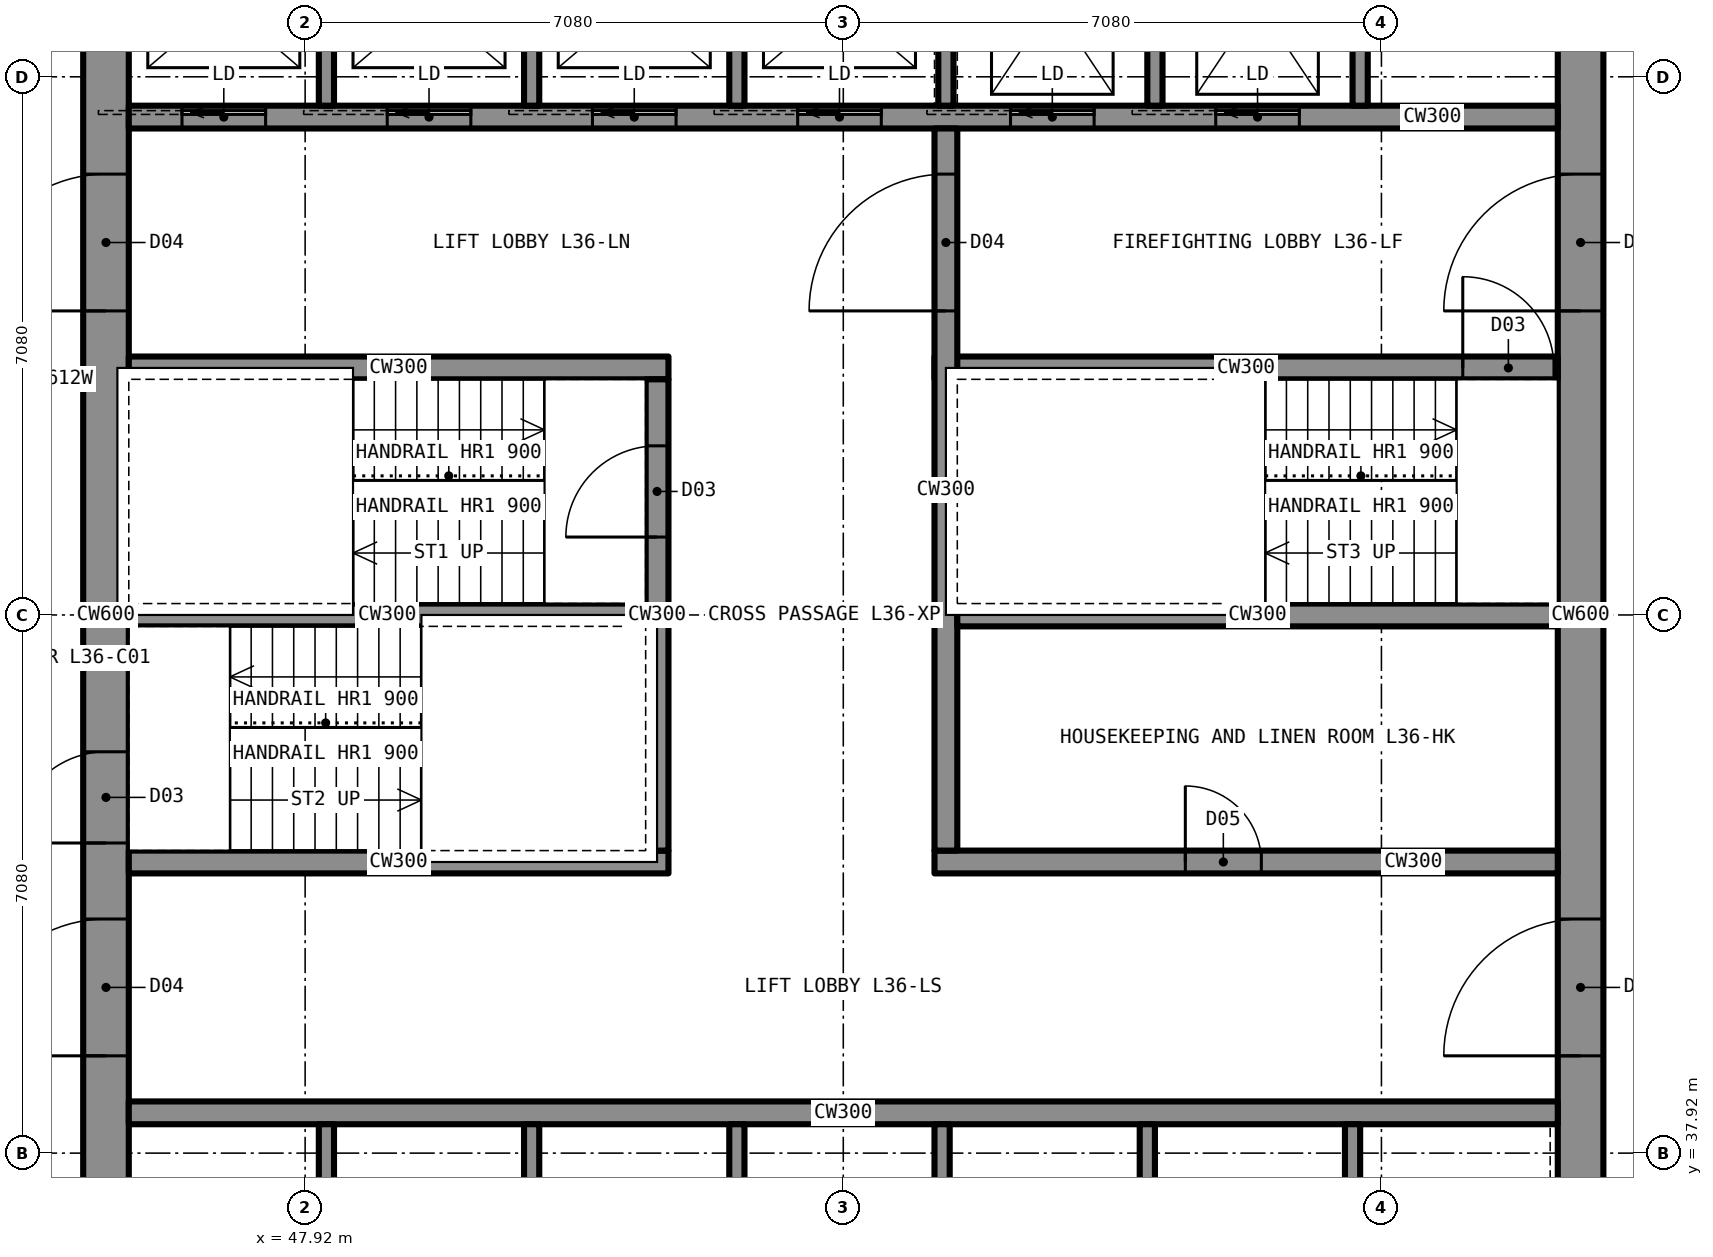
"""IFC4 building model, lengths in metres.
Left out: names, types, materials, properties, quantities, classifications, styles, units other than length and angle.
Written with IfcOpenShell. Run it as: python <this file> out.ifc"""

import sys

from ifc_helpers import new_model, si_unit, direction, frame, frame_2d, origin, place, context, subcontext, project, spatial, rectangle, extrude, element, fill, save


model = new_model("IFC4")
c1 = context("Model", 3, precision=1e-05, world=origin(), true_north=direction((0.0, 1.0)))
c2 = subcontext(c1, "Body", "Model", "MODEL_VIEW")
j1 = project(units=[si_unit("LENGTHUNIT", "METRE"), si_unit("PLANEANGLEUNIT", "RADIAN")], contexts=[c1])
p1 = place(None, origin())
s1 = spatial("IfcSite", under=j1, at=p1, CompositionType="ELEMENT")
p2 = place(p1, origin())
s2 = spatial("IfcBuilding", under=s1, at=p2, CompositionType="ELEMENT")
p3 = place(p2, frame((0.0, 0.0, 135.4)))
s3 = spatial("IfcBuildingStorey", under=s2, at=p3, CompositionType="ELEMENT", Elevation=135.4)
p4 = place(p3, frame((64.7, 35.6, 0.0), z_axis=(0.0, 0.0, 1.0), x_axis=(0.0, 1.0, 0.0)))
e1 = element("IfcWall", 1, at=p4, inside=s3, PredefinedType="SHEAR", context=c2, shape_type="SweptSolid", body=[
    extrude(rectangle(XDim=18.8, YDim=0.6, at=frame_2d((9.4, 0.0))), origin(), (0.0, 0.0, 1.0), 3.5),
])
p5 = place(p4, frame((13.4, 0.0, 0.0)))
e2 = element("IfcOpeningElement", 2, at=p5, cuts=e1, PredefinedType="OPENING", context=c2, shape_type="SweptSolid", body=[
    extrude(rectangle(XDim=1.8, YDim=2.2, at=frame_2d((0.9, 1.1))), frame((0.0, 0.31, 0.0), z_axis=(0.0, -1.0, 0.0), x_axis=(1.0, 0.0, 0.0)), (0.0, 0.0, 1.0), 0.62),
])
p6 = place(p4, frame((3.6, 0.0, 0.0)))
e3 = element("IfcOpeningElement", 3, at=p6, cuts=e1, PredefinedType="OPENING", context=c2, shape_type="SweptSolid", body=[
    extrude(rectangle(XDim=1.8, YDim=2.2, at=frame_2d((0.9, 1.1))), frame((0.0, 0.31, 0.0), z_axis=(0.0, -1.0, 0.0), x_axis=(1.0, 0.0, 0.0)), (0.0, 0.0, 1.0), 0.62),
])
p7 = place(p3, frame((45.3, 35.6, 0.0), z_axis=(0.0, 0.0, 1.0), x_axis=(0.0, 1.0, 0.0)))
e4 = element("IfcWall", 4, at=p7, inside=s3, PredefinedType="SHEAR", context=c2, shape_type="SweptSolid", body=[
    extrude(rectangle(XDim=18.8, YDim=0.6, at=frame_2d((9.4, 0.0))), origin(), (0.0, 0.0, 1.0), 3.5),
])
p8 = place(p7, frame((13.4, 0.0, 0.0)))
e5 = element("IfcOpeningElement", 5, at=p8, cuts=e4, PredefinedType="OPENING", context=c2, shape_type="SweptSolid", body=[
    extrude(rectangle(XDim=1.8, YDim=2.2, at=frame_2d((0.9, 1.1))), frame((0.0, 0.31, 0.0), z_axis=(0.0, -1.0, 0.0), x_axis=(1.0, 0.0, 0.0)), (0.0, 0.0, 1.0), 0.62),
])
p9 = place(p7, frame((3.6, 0.0, 0.0)))
e6 = element("IfcOpeningElement", 6, at=p9, cuts=e4, PredefinedType="OPENING", context=c2, shape_type="SweptSolid", body=[
    extrude(rectangle(XDim=1.8, YDim=2.2, at=frame_2d((0.9, 1.1))), frame((0.0, 0.31, 0.0), z_axis=(0.0, -1.0, 0.0), x_axis=(1.0, 0.0, 0.0)), (0.0, 0.0, 1.0), 0.62),
])
p10 = place(p7, frame((6.4, 0.0, 0.0)))
e7 = element("IfcOpeningElement", 7, at=p10, cuts=e4, PredefinedType="OPENING", context=c2, shape_type="SweptSolid", body=[
    extrude(rectangle(XDim=1.2, YDim=2.2, at=frame_2d((0.6, 1.1))), frame((0.0, 0.31, 0.0), z_axis=(0.0, -1.0, 0.0), x_axis=(1.0, 0.0, 0.0)), (0.0, 0.0, 1.0), 0.62),
])
p11 = place(p3, frame((45.6, 51.55, 0.0), z_axis=(0.0, 0.0, 1.0), x_axis=(1.0, 0.0, 0.0)))
e8 = element("IfcWall", 8, at=p11, inside=s3, PredefinedType="SHEAR", context=c2, shape_type="SweptSolid", body=[
    extrude(rectangle(XDim=18.8, YDim=0.3, at=frame_2d((9.4, 0.0))), origin(), (0.0, 0.0, 1.0), 3.5),
])
p12 = place(p11, frame((0.7, 0.0, 0.0)))
e9 = element("IfcOpeningElement", 9, at=p12, cuts=e8, PredefinedType="OPENING", context=c2, shape_type="SweptSolid", body=[
    extrude(rectangle(XDim=1.1, YDim=2.2, at=frame_2d((0.55, 1.1))), frame((0.0, 0.16, 0.0), z_axis=(0.0, -1.0, 0.0), x_axis=(1.0, 0.0, 0.0)), (0.0, 0.0, 1.0), 0.32),
])
p13 = place(p11, frame((3.4, 0.0, 0.0)))
e10 = element("IfcOpeningElement", 10, at=p13, cuts=e8, PredefinedType="OPENING", context=c2, shape_type="SweptSolid", body=[
    extrude(rectangle(XDim=1.1, YDim=2.2, at=frame_2d((0.55, 1.1))), frame((0.0, 0.16, 0.0), z_axis=(0.0, -1.0, 0.0), x_axis=(1.0, 0.0, 0.0)), (0.0, 0.0, 1.0), 0.32),
])
p14 = place(p11, frame((6.1, 0.0, 0.0)))
e11 = element("IfcOpeningElement", 11, at=p14, cuts=e8, PredefinedType="OPENING", context=c2, shape_type="SweptSolid", body=[
    extrude(rectangle(XDim=1.1, YDim=2.2, at=frame_2d((0.55, 1.1))), frame((0.0, 0.16, 0.0), z_axis=(0.0, -1.0, 0.0), x_axis=(1.0, 0.0, 0.0)), (0.0, 0.0, 1.0), 0.32),
])
p15 = place(p11, frame((8.8, 0.0, 0.0)))
e12 = element("IfcOpeningElement", 12, at=p15, cuts=e8, PredefinedType="OPENING", context=c2, shape_type="SweptSolid", body=[
    extrude(rectangle(XDim=1.1, YDim=2.2, at=frame_2d((0.55, 1.1))), frame((0.0, 0.16, 0.0), z_axis=(0.0, -1.0, 0.0), x_axis=(1.0, 0.0, 0.0)), (0.0, 0.0, 1.0), 0.32),
])
p16 = place(p11, frame((11.6, 0.0, 0.0)))
e13 = element("IfcOpeningElement", 13, at=p16, cuts=e8, PredefinedType="OPENING", context=c2, shape_type="SweptSolid", body=[
    extrude(rectangle(XDim=1.1, YDim=2.2, at=frame_2d((0.55, 1.1))), frame((0.0, 0.16, 0.0), z_axis=(0.0, -1.0, 0.0), x_axis=(1.0, 0.0, 0.0)), (0.0, 0.0, 1.0), 0.32),
])
p17 = place(p11, frame((14.3, 0.0, 0.0)))
e14 = element("IfcOpeningElement", 14, at=p17, cuts=e8, PredefinedType="OPENING", context=c2, shape_type="SweptSolid", body=[
    extrude(rectangle(XDim=1.1, YDim=2.2, at=frame_2d((0.55, 1.1))), frame((0.0, 0.16, 0.0), z_axis=(0.0, -1.0, 0.0), x_axis=(1.0, 0.0, 0.0)), (0.0, 0.0, 1.0), 0.32),
])
p18 = place(p3, frame((45.6, 38.45, 0.0), z_axis=(0.0, 0.0, 1.0), x_axis=(1.0, 0.0, 0.0)))
e15 = element("IfcWall", 15, at=p18, inside=s3, PredefinedType="SHEAR", context=c2, shape_type="SweptSolid", body=[
    extrude(rectangle(XDim=18.8, YDim=0.3, at=frame_2d((9.4, 0.0))), origin(), (0.0, 0.0, 1.0), 3.5),
])
p19 = place(p3, frame((45.6, 48.25, 0.0), z_axis=(0.0, 0.0, 1.0), x_axis=(1.0, 0.0, 0.0)))
e16 = element("IfcWall", 16, at=p19, inside=s3, PredefinedType="SHEAR", context=c2, shape_type="SweptSolid", body=[
    extrude(rectangle(XDim=7.1, YDim=0.3, at=frame_2d((3.55, 0.0))), origin(), (0.0, 0.0, 1.0), 3.5),
])
p20 = place(p3, frame((56.2, 48.25, 0.0), z_axis=(0.0, 0.0, 1.0), x_axis=(1.0, 0.0, 0.0)))
e17 = element("IfcWall", 17, at=p20, inside=s3, PredefinedType="SHEAR", context=c2, shape_type="SweptSolid", body=[
    extrude(rectangle(XDim=8.2, YDim=0.3, at=frame_2d((4.1, 0.0))), origin(), (0.0, 0.0, 1.0), 3.5),
])
p21 = place(p20, frame((6.95, 0.0, 0.0)))
e18 = element("IfcOpeningElement", 18, at=p21, cuts=e17, PredefinedType="OPENING", context=c2, shape_type="SweptSolid", body=[
    extrude(rectangle(XDim=1.2, YDim=2.2, at=frame_2d((0.6, 1.1))), frame((0.0, 0.16, 0.0), z_axis=(0.0, -1.0, 0.0), x_axis=(1.0, 0.0, 0.0)), (0.0, 0.0, 1.0), 0.32),
])
p22 = place(p3, frame((45.6, 41.75, 0.0), z_axis=(0.0, 0.0, 1.0), x_axis=(1.0, 0.0, 0.0)))
e19 = element("IfcWall", 19, at=p22, inside=s3, PredefinedType="SHEAR", context=c2, shape_type="SweptSolid", body=[
    extrude(rectangle(XDim=7.1, YDim=0.3, at=frame_2d((3.55, 0.0))), origin(), (0.0, 0.0, 1.0), 3.5),
])
p23 = place(p3, frame((56.2, 41.75, 0.0), z_axis=(0.0, 0.0, 1.0), x_axis=(1.0, 0.0, 0.0)))
e20 = element("IfcWall", 20, at=p23, inside=s3, PredefinedType="SHEAR", context=c2, shape_type="SweptSolid", body=[
    extrude(rectangle(XDim=8.2, YDim=0.3, at=frame_2d((4.1, 0.0))), origin(), (0.0, 0.0, 1.0), 3.5),
])
p24 = place(p23, frame((3.3, 0.0, 0.0)))
e21 = element("IfcOpeningElement", 21, at=p24, cuts=e20, PredefinedType="OPENING", context=c2, shape_type="SweptSolid", body=[
    extrude(rectangle(XDim=1.0, YDim=2.1, at=frame_2d((0.5, 1.05))), frame((0.0, 0.16, 0.0), z_axis=(0.0, -1.0, 0.0), x_axis=(1.0, 0.0, 0.0)), (0.0, 0.0, 1.0), 0.32),
])
p25 = place(p3, frame((52.55, 41.9, 0.0), z_axis=(0.0, 0.0, 1.0), x_axis=(0.0, 1.0, 0.0)))
e22 = element("IfcWall", 22, at=p25, inside=s3, PredefinedType="SHEAR", context=c2, shape_type="SweptSolid", body=[
    extrude(rectangle(XDim=6.2, YDim=0.3, at=frame_2d((3.1, 0.0))), origin(), (0.0, 0.0, 1.0), 3.5),
])
p26 = place(p25, frame((4.125, 0.0, 0.0)))
e23 = element("IfcOpeningElement", 23, at=p26, cuts=e22, PredefinedType="OPENING", context=c2, shape_type="SweptSolid", body=[
    extrude(rectangle(XDim=1.2, YDim=2.2, at=frame_2d((0.6, 1.1))), frame((0.0, 0.16, 0.0), z_axis=(0.0, -1.0, 0.0), x_axis=(1.0, 0.0, 0.0)), (0.0, 0.0, 1.0), 0.32),
])
p27 = place(p3, frame((56.35, 41.9, 0.0), z_axis=(0.0, 0.0, 1.0), x_axis=(0.0, 1.0, 0.0)))
e24 = element("IfcWall", 24, at=p27, inside=s3, PredefinedType="SHEAR", context=c2, shape_type="SweptSolid", body=[
    extrude(rectangle(XDim=9.5, YDim=0.3, at=frame_2d((4.75, 0.0))), origin(), (0.0, 0.0, 1.0), 3.5),
])
p28 = place(p27, frame((7.1, 0.0, 0.0)))
e25 = element("IfcOpeningElement", 25, at=p28, cuts=e24, PredefinedType="OPENING", context=c2, shape_type="SweptSolid", body=[
    extrude(rectangle(XDim=1.8, YDim=2.2, at=frame_2d((0.9, 1.1))), frame((0.0, 0.16, 0.0), z_axis=(0.0, -1.0, 0.0), x_axis=(1.0, 0.0, 0.0)), (0.0, 0.0, 1.0), 0.32),
])
p29 = place(p3, frame((45.6, 45.0, 0.0), z_axis=(0.0, 0.0, 1.0), x_axis=(1.0, 0.0, 0.0)))
e26 = element("IfcWall", 26, at=p29, inside=s3, PredefinedType="SHEAR", context=c2, shape_type="SweptSolid", body=[
    extrude(rectangle(XDim=6.8, YDim=0.3, at=frame_2d((3.4, 0.0))), origin(), (0.0, 0.0, 1.0), 3.5),
])
p30 = place(p3, frame((56.5, 45.0, 0.0), z_axis=(0.0, 0.0, 1.0), x_axis=(1.0, 0.0, 0.0)))
e27 = element("IfcWall", 27, at=p30, inside=s3, PredefinedType="SHEAR", context=c2, shape_type="SweptSolid", body=[
    extrude(rectangle(XDim=7.9, YDim=0.3, at=frame_2d((3.95, 0.0))), origin(), (0.0, 0.0, 1.0), 3.5),
])
for number, where, z_axis, x_axis in (
    (28, (48.2, 51.7, 0.0), (0.0, 0.0, 1.0), (0.0, 1.0, 0.0)),
    (29, (50.9, 51.7, 0.0), (0.0, 0.0, 1.0), (0.0, 1.0, 0.0)),
    (30, (53.6, 51.7, 0.0), (0.0, 0.0, 1.0), (0.0, 1.0, 0.0)),
    (31, (59.1, 51.7, 0.0), (0.0, 0.0, 1.0), (0.0, 1.0, 0.0)),
    (32, (61.8, 51.7, 0.0), (0.0, 0.0, 1.0), (0.0, 1.0, 0.0)),
    (33, (56.35, 51.7, 0.0), (0.0, 0.0, 1.0), (0.0, 1.0, 0.0)),
    (34, (48.2, 35.6, 0.0), (0.0, 0.0, 1.0), (0.0, 1.0, 0.0)),
    (35, (50.9, 35.6, 0.0), (0.0, 0.0, 1.0), (0.0, 1.0, 0.0)),
    (36, (53.6, 35.6, 0.0), (0.0, 0.0, 1.0), (0.0, 1.0, 0.0)),
    (37, (56.3, 35.6, 0.0), (0.0, 0.0, 1.0), (0.0, 1.0, 0.0)),
    (38, (59.0, 35.6, 0.0), (0.0, 0.0, 1.0), (0.0, 1.0, 0.0)),
    (39, (61.7, 35.6, 0.0), (0.0, 0.0, 1.0), (0.0, 1.0, 0.0)),
):
    element("IfcWall", number, at=place(p3, frame(where, z_axis=z_axis, x_axis=x_axis)), inside=s3, PredefinedType="PARTITIONING", context=c2, shape_type="SweptSolid", body=[
        extrude(rectangle(XDim=2.7, YDim=0.2, at=frame_2d((1.35, 0.0))), origin(), (0.0, 0.0, 1.0), 3.33),
    ])
p31 = place(p8, origin())
e40 = element("IfcDoor", 40, at=p31, inside=s3, OperationType="DOUBLE_DOOR_SINGLE_SWING", PredefinedType="DOOR", context=c2, shape_type="SweptSolid", body=[
    extrude(rectangle(XDim=1.8, YDim=2.2, at=frame_2d((0.9, 1.1))), frame((0.0, 0.025, 0.0), z_axis=(0.0, -1.0, 0.0), x_axis=(1.0, 0.0, 0.0)), (0.0, 0.0, 1.0), 0.05),
])
fill(e5, e40)
p32 = place(p9, origin())
e41 = element("IfcDoor", 41, at=p32, inside=s3, OperationType="DOUBLE_DOOR_SINGLE_SWING", PredefinedType="DOOR", context=c2, shape_type="SweptSolid", body=[
    extrude(rectangle(XDim=1.8, YDim=2.2, at=frame_2d((0.9, 1.1))), frame((0.0, 0.025, 0.0), z_axis=(0.0, -1.0, 0.0), x_axis=(1.0, 0.0, 0.0)), (0.0, 0.0, 1.0), 0.05),
])
fill(e6, e41)
p33 = place(p5, origin())
e42 = element("IfcDoor", 42, at=p33, inside=s3, OperationType="DOUBLE_DOOR_SINGLE_SWING", PredefinedType="DOOR", context=c2, shape_type="SweptSolid", body=[
    extrude(rectangle(XDim=1.8, YDim=2.2, at=frame_2d((0.9, 1.1))), frame((0.0, 0.025, 0.0), z_axis=(0.0, -1.0, 0.0), x_axis=(1.0, 0.0, 0.0)), (0.0, 0.0, 1.0), 0.05),
])
fill(e2, e42)
p34 = place(p6, origin())
e43 = element("IfcDoor", 43, at=p34, inside=s3, OperationType="DOUBLE_DOOR_SINGLE_SWING", PredefinedType="DOOR", context=c2, shape_type="SweptSolid", body=[
    extrude(rectangle(XDim=1.8, YDim=2.2, at=frame_2d((0.9, 1.1))), frame((0.0, 0.025, 0.0), z_axis=(0.0, -1.0, 0.0), x_axis=(1.0, 0.0, 0.0)), (0.0, 0.0, 1.0), 0.05),
])
fill(e3, e43)
p35 = place(p28, origin())
e44 = element("IfcDoor", 44, at=p35, inside=s3, OperationType="DOUBLE_DOOR_SINGLE_SWING", PredefinedType="DOOR", context=c2, shape_type="SweptSolid", body=[
    extrude(rectangle(XDim=1.8, YDim=2.2, at=frame_2d((0.9, 1.1))), frame((0.0, 0.025, 0.0), z_axis=(0.0, -1.0, 0.0), x_axis=(1.0, 0.0, 0.0)), (0.0, 0.0, 1.0), 0.05),
])
fill(e25, e44)
p36 = place(p26, origin())
e45 = element("IfcDoor", 45, at=p36, inside=s3, OperationType="SINGLE_SWING_LEFT", PredefinedType="DOOR", context=c2, shape_type="SweptSolid", body=[
    extrude(rectangle(XDim=1.2, YDim=2.2, at=frame_2d((0.6, 1.1))), frame((0.0, 0.025, 0.0), z_axis=(0.0, -1.0, 0.0), x_axis=(1.0, 0.0, 0.0)), (0.0, 0.0, 1.0), 0.05),
])
fill(e23, e45)
p37 = place(p10, origin())
e46 = element("IfcDoor", 46, at=p37, inside=s3, OperationType="SINGLE_SWING_LEFT", PredefinedType="DOOR", context=c2, shape_type="SweptSolid", body=[
    extrude(rectangle(XDim=1.2, YDim=2.2, at=frame_2d((0.6, 1.1))), frame((0.0, 0.025, 0.0), z_axis=(0.0, -1.0, 0.0), x_axis=(1.0, 0.0, 0.0)), (0.0, 0.0, 1.0), 0.05),
])
fill(e7, e46)
p38 = place(p21, origin())
e47 = element("IfcDoor", 47, at=p38, inside=s3, OperationType="SINGLE_SWING_LEFT", PredefinedType="DOOR", context=c2, shape_type="SweptSolid", body=[
    extrude(rectangle(XDim=1.2, YDim=2.2, at=frame_2d((0.6, 1.1))), frame((0.0, 0.025, 0.0), z_axis=(0.0, -1.0, 0.0), x_axis=(1.0, 0.0, 0.0)), (0.0, 0.0, 1.0), 0.05),
])
fill(e18, e47)
p39 = place(p24, origin())
e48 = element("IfcDoor", 48, at=p39, inside=s3, OperationType="SINGLE_SWING_LEFT", PredefinedType="DOOR", context=c2, shape_type="SweptSolid", body=[
    extrude(rectangle(XDim=1.0, YDim=2.1, at=frame_2d((0.5, 1.05))), frame((0.0, 0.025, 0.0), z_axis=(0.0, -1.0, 0.0), x_axis=(1.0, 0.0, 0.0)), (0.0, 0.0, 1.0), 0.05),
])
fill(e21, e48)
p40 = place(p12, origin())
e49 = element("IfcDoor", 49, at=p40, inside=s3, OperationType="SLIDING_TO_LEFT", PredefinedType="DOOR", context=c2, shape_type="SweptSolid", body=[
    extrude(rectangle(XDim=1.1, YDim=2.2, at=frame_2d((0.55, 1.1))), frame((0.0, 0.025, 0.0), z_axis=(0.0, -1.0, 0.0), x_axis=(1.0, 0.0, 0.0)), (0.0, 0.0, 1.0), 0.05),
])
fill(e9, e49)
p41 = place(p13, origin())
e50 = element("IfcDoor", 50, at=p41, inside=s3, OperationType="SLIDING_TO_LEFT", PredefinedType="DOOR", context=c2, shape_type="SweptSolid", body=[
    extrude(rectangle(XDim=1.1, YDim=2.2, at=frame_2d((0.55, 1.1))), frame((0.0, 0.025, 0.0), z_axis=(0.0, -1.0, 0.0), x_axis=(1.0, 0.0, 0.0)), (0.0, 0.0, 1.0), 0.05),
])
fill(e10, e50)
p42 = place(p14, origin())
e51 = element("IfcDoor", 51, at=p42, inside=s3, OperationType="SLIDING_TO_LEFT", PredefinedType="DOOR", context=c2, shape_type="SweptSolid", body=[
    extrude(rectangle(XDim=1.1, YDim=2.2, at=frame_2d((0.55, 1.1))), frame((0.0, 0.025, 0.0), z_axis=(0.0, -1.0, 0.0), x_axis=(1.0, 0.0, 0.0)), (0.0, 0.0, 1.0), 0.05),
])
fill(e11, e51)
p43 = place(p15, origin())
e52 = element("IfcDoor", 52, at=p43, inside=s3, OperationType="SLIDING_TO_LEFT", PredefinedType="DOOR", context=c2, shape_type="SweptSolid", body=[
    extrude(rectangle(XDim=1.1, YDim=2.2, at=frame_2d((0.55, 1.1))), frame((0.0, 0.025, 0.0), z_axis=(0.0, -1.0, 0.0), x_axis=(1.0, 0.0, 0.0)), (0.0, 0.0, 1.0), 0.05),
])
fill(e12, e52)
p44 = place(p16, origin())
e53 = element("IfcDoor", 53, at=p44, inside=s3, OperationType="SLIDING_TO_LEFT", PredefinedType="DOOR", context=c2, shape_type="SweptSolid", body=[
    extrude(rectangle(XDim=1.1, YDim=2.2, at=frame_2d((0.55, 1.1))), frame((0.0, 0.025, 0.0), z_axis=(0.0, -1.0, 0.0), x_axis=(1.0, 0.0, 0.0)), (0.0, 0.0, 1.0), 0.05),
])
fill(e13, e53)
p45 = place(p17, origin())
e54 = element("IfcDoor", 54, at=p45, inside=s3, OperationType="SLIDING_TO_LEFT", PredefinedType="DOOR", context=c2, shape_type="SweptSolid", body=[
    extrude(rectangle(XDim=1.1, YDim=2.2, at=frame_2d((0.55, 1.1))), frame((0.0, 0.025, 0.0), z_axis=(0.0, -1.0, 0.0), x_axis=(1.0, 0.0, 0.0)), (0.0, 0.0, 1.0), 0.05),
])
fill(e14, e54)
save(model, sys.argv[1])
